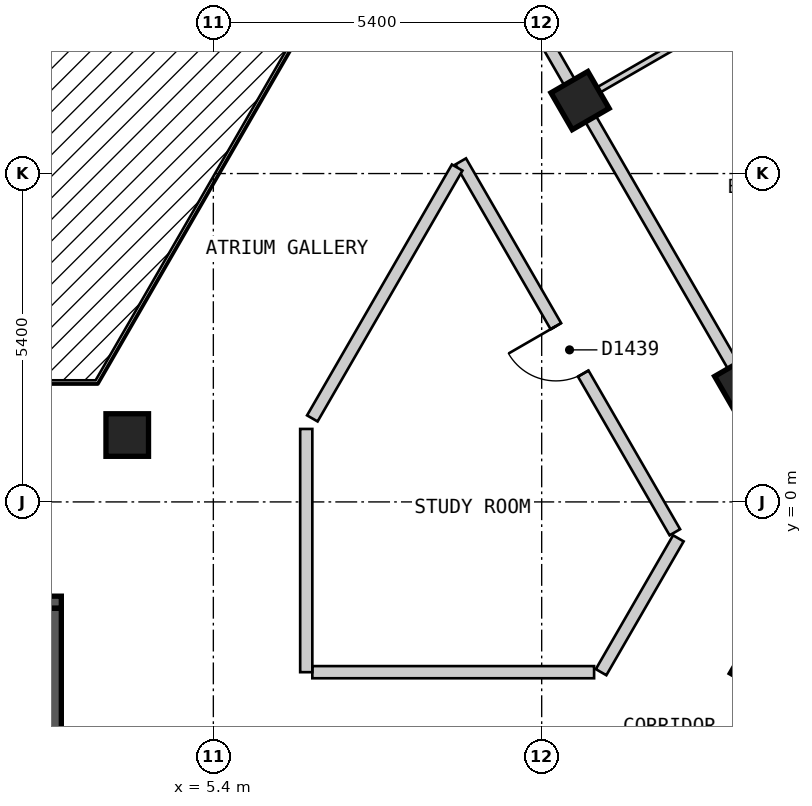
"""IFC4 building model, lengths in metres.
Left out: names, types, materials, properties, quantities, classifications, styles, units other than length and angle.
Written with IfcOpenShell. Run it as: python <this file> out.ifc"""

import sys

from ifc_helpers import new_model, si_unit, direction, frame, frame_2d, origin, origin_2d, place, context, subcontext, project, spatial, rectangle, extrude, element, fill, save


model = new_model("IFC4")
c1 = context("Model", 3, precision=1e-05, world=origin(), true_north=direction((0.0, 1.0)))
c2 = subcontext(c1, "Body", "Model", "MODEL_VIEW")
j1 = project(units=[si_unit("LENGTHUNIT", "METRE"), si_unit("PLANEANGLEUNIT", "RADIAN")], contexts=[c1])
p1 = place(None, origin())
s1 = spatial("IfcSite", under=j1, at=p1, CompositionType="ELEMENT")
p2 = place(p1, origin())
s2 = spatial("IfcBuilding", under=s1, at=p2, CompositionType="ELEMENT")
p3 = place(p2, frame((0.0, 0.0, 172.2)))
s3 = spatial("IfcBuildingStorey", under=s2, at=p3, CompositionType="ELEMENT", Elevation=172.2)
for number, where, z_axis, x_axis in (
    (1, (14.382, -2.689, 0.0), (0.0, 0.0, 1.0), (0.5, 0.866, 0.0)),
    (2, (14.123, 1.937, 0.0), (0.0, 0.0, 1.0), (-0.5, 0.866, 0.0)),
    (3, (3.984, 1.1, 0.0), (0.0, 0.0, 1.0), (1.0, 0.0, 0.0)),
    (4, (11.431, 6.6, 0.0), (0.0, 0.0, 1.0), (-0.5, 0.866, 0.0)),
):
    element("IfcColumn", number, at=place(p3, frame(where, z_axis=z_axis, x_axis=x_axis)), inside=s3, PredefinedType="COLUMN", context=c2, shape_type="SweptSolid", body=[
        extrude(rectangle(XDim=0.7, YDim=0.7, at=origin_2d()), origin(), (0.0, 0.0, 1.0), 3.0),
    ])
p4 = place(p3, frame((-2.9, -1.65, 0.0), z_axis=(0.0, 0.0, 1.0), x_axis=(1.0, 0.0, 0.0)))
e5 = element("IfcWall", 5, at=p4, inside=s3, PredefinedType="SOLIDWALL", context=c2, shape_type="SweptSolid", body=[
    extrude(rectangle(XDim=5.8, YDim=0.2, at=frame_2d((2.9, 0.0))), origin(), (0.0, 0.0, 1.0), 2.7),
])
p5 = place(p4, frame((0.3, 0.0, 0.0)))
e6 = element("IfcOpeningElement", 6, at=p5, cuts=e5, PredefinedType="OPENING", context=c2, shape_type="SweptSolid", body=[
    extrude(rectangle(XDim=1.2, YDim=2.1, at=frame_2d((0.6, 1.05))), frame((0.0, 0.11, 0.0), z_axis=(0.0, -1.0, 0.0), x_axis=(1.0, 0.0, 0.0)), (0.0, 0.0, 1.0), 0.22),
])
p6 = place(p3, frame((2.8, -4.5, 0.0), z_axis=(0.0, 0.0, 1.0), x_axis=(0.0, 1.0, 0.0)))
e7 = element("IfcWall", 7, at=p6, inside=s3, PredefinedType="SOLIDWALL", context=c2, shape_type="SweptSolid", body=[
    extrude(rectangle(XDim=2.75, YDim=0.2, at=frame_2d((1.375, 0.0))), origin(), (0.0, 0.0, 1.0), 2.7),
])
p7 = place(p3, frame((9.469, 5.6, 0.0), z_axis=(0.0, 0.0, 1.0), x_axis=(0.499964524401, -0.866045884662, 0.0)))
e8 = element("IfcWall", 8, at=p7, inside=s3, PredefinedType="PARTITIONING", context=c2, shape_type="SweptSolid", body=[
    extrude(rectangle(XDim=7.042, YDim=0.2, at=frame_2d((3.521, 0.0))), origin(), (0.0, 0.0, 1.0), 2.7),
])
p8 = place(p7, frame((3.129, 0.0, 0.0)))
e9 = element("IfcOpeningElement", 9, at=p8, cuts=e8, PredefinedType="OPENING", context=c2, shape_type="SweptSolid", body=[
    extrude(rectangle(XDim=0.9, YDim=2.1, at=frame_2d((0.45, 1.05))), frame((0.0, 0.11, 0.0), z_axis=(0.0, -1.0, 0.0), x_axis=(1.0, 0.0, 0.0)), (0.0, 0.0, 1.0), 0.22),
])
p9 = place(p3, frame((10.739, 7.8, 0.0), z_axis=(0.0, 0.0, 1.0), x_axis=(0.499964311759, -0.86604600742, 0.0)))
e10 = element("IfcWall", 10, at=p9, inside=s3, PredefinedType="PARTITIONING", context=c2, shape_type="SweptSolid", body=[
    extrude(rectangle(XDim=9.583, YDim=0.2, at=frame_2d((4.792, 0.0))), origin(), (0.0, 0.0, 1.0), 2.7),
])
p10 = place(p3, frame((7.028, -2.8, 0.0), z_axis=(0.0, 0.0, 1.0), x_axis=(1.0, 0.0, 0.0)))
e11 = element("IfcWall", 11, at=p10, inside=s3, PredefinedType="PARTITIONING", context=c2, shape_type="SweptSolid", body=[
    extrude(rectangle(XDim=4.634, YDim=0.2, at=frame_2d((2.317, 0.0))), origin(), (0.0, 0.0, 1.0), 2.7),
])
p11 = place(p3, frame((7.028, 1.373, 0.0), z_axis=(0.0, 0.0, 1.0), x_axis=(0.499953126767, 0.866052464367, 0.0)))
e12 = element("IfcWall", 12, at=p11, inside=s3, PredefinedType="PARTITIONING", context=c2, shape_type="SweptSolid", body=[
    extrude(rectangle(XDim=4.764, YDim=0.2, at=frame_2d((2.382, 0.0))), origin(), (0.0, 0.0, 1.0), 2.7),
])
p12 = place(p3, frame((11.777, -2.8, 0.0), z_axis=(0.0, 0.0, 1.0), x_axis=(0.500085537782, 0.86597601289, 0.0)))
e13 = element("IfcWall", 13, at=p12, inside=s3, PredefinedType="PARTITIONING", context=c2, shape_type="SweptSolid", body=[
    extrude(rectangle(XDim=2.542, YDim=0.2, at=frame_2d((1.271, 0.0))), origin(), (0.0, 0.0, 1.0), 2.7),
])
p13 = place(p3, frame((6.928, -2.8, 0.0), z_axis=(0.0, 0.0, 1.0), x_axis=(0.0, 1.0, 0.0)))
e14 = element("IfcWall", 14, at=p13, inside=s3, PredefinedType="PARTITIONING", context=c2, shape_type="SweptSolid", body=[
    extrude(rectangle(XDim=4.0, YDim=0.2, at=frame_2d((2.0, 0.0))), origin(), (0.0, 0.0, 1.0), 2.7),
])
p14 = place(p3, frame((11.518, 6.65, 0.0), z_axis=(0.0, 0.0, 1.0), x_axis=(0.865949381454, 0.500131651427, 0.0)))
e15 = element("IfcWall", 15, at=p14, inside=s3, PredefinedType="PARTITIONING", context=c2, shape_type="SweptSolid", body=[
    extrude(rectangle(XDim=4.097, YDim=0.1, at=frame_2d((2.049, 0.0))), origin(), (0.0, 0.0, 1.0), 2.7),
])
p15 = place(p14, frame((1.623, 0.0, 0.0)))
e16 = element("IfcOpeningElement", 16, at=p15, cuts=e15, PredefinedType="OPENING", context=c2, shape_type="SweptSolid", body=[
    extrude(rectangle(XDim=0.8, YDim=2.1, at=frame_2d((0.4, 1.05))), frame((0.0, 0.06, 0.0), z_axis=(0.0, -1.0, 0.0), x_axis=(1.0, 0.0, 0.0)), (0.0, 0.0, 1.0), 0.12),
])
p16 = place(p8, origin())
e17 = element("IfcDoor", 17, at=p16, inside=s3, OperationType="SINGLE_SWING_LEFT", PredefinedType="DOOR", context=c2, shape_type="SweptSolid", body=[
    extrude(rectangle(XDim=0.9, YDim=2.1, at=frame_2d((0.45, 1.05))), frame((0.0, 0.025, 0.0), z_axis=(0.0, -1.0, 0.0), x_axis=(1.0, 0.0, 0.0)), (0.0, 0.0, 1.0), 0.05),
])
fill(e9, e17)
save(model, sys.argv[1])
